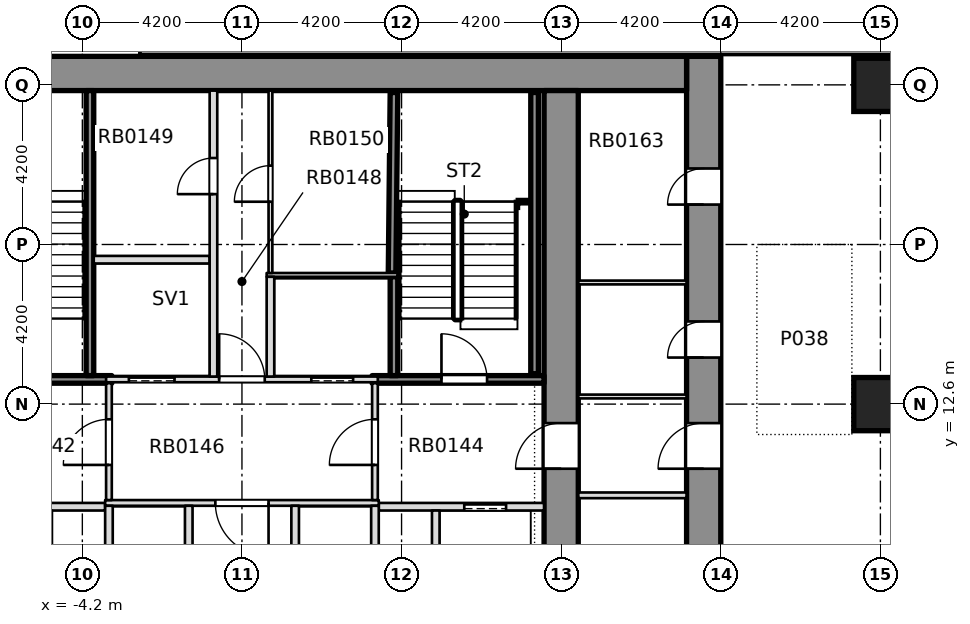
"""IFC4 building model, lengths in metres.
Left out: names, types, materials, properties, quantities, classifications, styles, units other than length and angle.
Written with IfcOpenShell. Run it as: python <this file> out.ifc"""

import sys

from ifc_helpers import new_model, si_unit, direction, frame, frame_2d, origin, origin_2d, place, context, subcontext, project, spatial, rectangle, extrude, element, fill, save


model = new_model("IFC4")
c1 = context("Model", 3, precision=1e-05, world=origin(), true_north=direction((0.0, 1.0)))
c2 = subcontext(c1, "Body", "Model", "MODEL_VIEW")
j1 = project(units=[si_unit("LENGTHUNIT", "METRE"), si_unit("PLANEANGLEUNIT", "RADIAN")], contexts=[c1])
p1 = place(None, origin())
s1 = spatial("IfcSite", under=j1, at=p1, CompositionType="ELEMENT")
p2 = place(p1, origin())
s2 = spatial("IfcBuilding", under=s1, at=p2, CompositionType="ELEMENT")
p3 = place(p2, frame((0.0, 0.0, -4.2)))
s3 = spatial("IfcBuildingStorey", under=s2, at=p3, CompositionType="ELEMENT", Elevation=-4.2)
p4 = place(p3, frame((12.15, -8.4, -0.35), z_axis=(0.0, 0.0, 1.0), x_axis=(0.0, 1.0, 0.0)))
e1 = element("IfcWall", 1, at=p4, inside=s3, PredefinedType="SHEAR", context=c2, shape_type="SweptSolid", body=[
    extrude(rectangle(XDim=30.15, YDim=0.9, at=frame_2d((15.075, 0.0))), origin(), (0.0, 0.0, 1.0), 4.1),
])
p5 = place(p4, frame((3.925, 0.0, 0.35)))
e2 = element("IfcOpeningElement", 2, at=p5, cuts=e1, PredefinedType="OPENING", context=c2, shape_type="SweptSolid", body=[
    extrude(rectangle(XDim=0.95, YDim=2.1, at=frame_2d((0.475, 1.05))), frame((0.0, 0.46, 0.0), z_axis=(0.0, -1.0, 0.0), x_axis=(1.0, 0.0, 0.0)), (0.0, 0.0, 1.0), 0.92),
])
p6 = place(p4, frame((9.175, 0.0, 0.35)))
e3 = element("IfcOpeningElement", 3, at=p6, cuts=e1, PredefinedType="OPENING", context=c2, shape_type="SweptSolid", body=[
    extrude(rectangle(XDim=0.95, YDim=2.1, at=frame_2d((0.475, 1.05))), frame((0.0, 0.46, 0.0), z_axis=(0.0, -1.0, 0.0), x_axis=(1.0, 0.0, 0.0)), (0.0, 0.0, 1.0), 0.92),
])
p7 = place(p4, frame((14.525, 0.0, 0.35)))
e4 = element("IfcOpeningElement", 4, at=p7, cuts=e1, PredefinedType="OPENING", context=c2, shape_type="SweptSolid", body=[
    extrude(rectangle(XDim=0.95, YDim=2.1, at=frame_2d((0.475, 1.05))), frame((0.0, 0.46, 0.0), z_axis=(0.0, -1.0, 0.0), x_axis=(1.0, 0.0, 0.0)), (0.0, 0.0, 1.0), 0.92),
])
p8 = place(p4, frame((22.225, 0.0, 0.35)))
e5 = element("IfcOpeningElement", 5, at=p8, cuts=e1, PredefinedType="OPENING", context=c2, shape_type="SweptSolid", body=[
    extrude(rectangle(XDim=0.95, YDim=2.1, at=frame_2d((0.475, 1.05))), frame((0.0, 0.46, 0.0), z_axis=(0.0, -1.0, 0.0), x_axis=(1.0, 0.0, 0.0)), (0.0, 0.0, 1.0), 0.92),
])
p9 = place(p4, frame((26.25, 0.0, 0.35)))
e6 = element("IfcOpeningElement", 6, at=p9, cuts=e1, PredefinedType="OPENING", context=c2, shape_type="SweptSolid", body=[
    extrude(rectangle(XDim=0.95, YDim=2.1, at=frame_2d((0.475, 1.05))), frame((0.0, 0.46, 0.0), z_axis=(0.0, -1.0, 0.0), x_axis=(1.0, 0.0, 0.0)), (0.0, 0.0, 1.0), 0.92),
])
p10 = place(p4, frame((19.3, 0.0, 0.35)))
e7 = element("IfcOpeningElement", 7, at=p10, cuts=e1, PredefinedType="OPENING", context=c2, shape_type="SweptSolid", body=[
    extrude(rectangle(XDim=1.2, YDim=2.1, at=frame_2d((0.6, 1.05))), frame((0.0, 0.46, 0.0), z_axis=(0.0, -1.0, 0.0), x_axis=(1.0, 0.0, 0.0)), (0.0, 0.0, 1.0), 0.92),
])
p11 = place(p3, frame((-11.7, 21.3, -0.35), z_axis=(0.0, 0.0, 1.0), x_axis=(1.0, 0.0, 0.0)))
e8 = element("IfcWall", 8, at=p11, inside=s3, PredefinedType="SOLIDWALL", context=c2, shape_type="SweptSolid", body=[
    extrude(rectangle(XDim=23.4, YDim=0.9, at=frame_2d((11.7, 0.0))), origin(), (0.0, 0.0, 1.0), 4.1),
])
p12 = place(p3, frame((8.4, -7.5, -0.35), z_axis=(0.0, 0.0, 1.0), x_axis=(0.0, 1.0, 0.0)))
e9 = element("IfcWall", 9, at=p12, inside=s3, PredefinedType="SHEAR", context=c2, shape_type="SweptSolid", body=[
    extrude(rectangle(XDim=28.35, YDim=0.9, at=frame_2d((14.175, 0.0))), origin(), (0.0, 0.0, 1.0), 4.1),
])
p13 = place(p12, frame((18.4, 0.0, 0.35)))
e10 = element("IfcOpeningElement", 10, at=p13, cuts=e9, PredefinedType="OPENING", context=c2, shape_type="SweptSolid", body=[
    extrude(rectangle(XDim=1.2, YDim=2.1, at=frame_2d((0.6, 1.05))), frame((0.0, 0.46, 0.0), z_axis=(0.0, -1.0, 0.0), x_axis=(1.0, 0.0, 0.0)), (0.0, 0.0, 1.0), 0.92),
])
for number, where, z_axis, x_axis in (
    (11, (16.8, 12.6, -0.35), (0.0, 0.0, 1.0), (1.0, 0.0, 0.0)),
    (12, (16.8, 21.0, -0.35), (0.0, 0.0, 1.0), (1.0, 0.0, 0.0)),
):
    element("IfcColumn", number, at=place(p3, frame(where, z_axis=z_axis, x_axis=x_axis)), inside=s3, PredefinedType="COLUMN", context=c2, shape_type="SweptSolid", body=[
        extrude(rectangle(XDim=1.4, YDim=1.4, at=origin_2d()), origin(), (0.0, 0.0, 1.0), 4.1),
    ])
p14 = place(p3, frame((-7.949, 9.9, 0.0), z_axis=(0.0, 0.0, 1.0), x_axis=(1.0, 0.0, 0.0)))
e13 = element("IfcWall", 13, at=p14, inside=s3, PredefinedType="PARTITIONING", context=c2, shape_type="SweptSolid", body=[
    extrude(rectangle(XDim=4.349, YDim=0.2, at=frame_2d((2.174, 0.0))), origin(), (0.0, 0.0, 1.0), 3.75),
])
p15 = place(p14, frame((0.999, 0.0, 0.0)))
e14 = element("IfcOpeningElement", 14, at=p15, cuts=e13, PredefinedType="OPENING", context=c2, shape_type="SweptSolid", body=[
    extrude(rectangle(XDim=1.1, YDim=2.1, at=frame_2d((0.55, 1.05))), frame((0.0, 0.11, 0.0), z_axis=(0.0, -1.0, 0.0), x_axis=(1.0, 0.0, 0.0)), (0.0, 0.0, 1.0), 0.22),
])
p16 = place(p3, frame((3.6, 9.9, 0.0), z_axis=(0.0, 0.0, 1.0), x_axis=(1.0, 0.0, 0.0)))
e15 = element("IfcWall", 15, at=p16, inside=s3, PredefinedType="PARTITIONING", context=c2, shape_type="SweptSolid", body=[
    extrude(rectangle(XDim=4.349, YDim=0.2, at=frame_2d((2.174, 0.0))), origin(), (0.0, 0.0, 1.0), 3.75),
])
p17 = place(p16, frame((2.25, 0.0, 0.0)))
e16 = element("IfcOpeningElement", 16, at=p17, cuts=e15, PredefinedType="OPENING", context=c2, shape_type="SweptSolid", body=[
    extrude(rectangle(XDim=1.1, YDim=2.1, at=frame_2d((0.55, 1.05))), frame((0.0, 0.11, 0.0), z_axis=(0.0, -1.0, 0.0), x_axis=(1.0, 0.0, 0.0)), (0.0, 0.0, 1.0), 0.22),
])
p18 = place(p3, frame((-3.6, 10.0, 0.0), z_axis=(0.0, 0.0, 1.0), x_axis=(1.0, 0.0, 0.0)))
e17 = element("IfcWall", 17, at=p18, inside=s3, PredefinedType="PARTITIONING", context=c2, shape_type="SweptSolid", body=[
    extrude(rectangle(XDim=7.2, YDim=0.15, at=frame_2d((3.6, 0.0))), origin(), (0.0, 0.0, 1.0), 3.75),
])
p19 = place(p18, frame((2.9, 0.0, 0.0)))
e18 = element("IfcOpeningElement", 18, at=p19, cuts=e17, PredefinedType="OPENING", context=c2, shape_type="SweptSolid", body=[
    extrude(rectangle(XDim=1.4, YDim=2.1, at=frame_2d((0.7, 1.05))), frame((0.0, 0.085, 0.0), z_axis=(0.0, -1.0, 0.0), x_axis=(1.0, 0.0, 0.0)), (0.0, 0.0, 1.0), 0.17),
])
p20 = place(p3, frame((-7.949, 13.25, 0.0), z_axis=(0.0, 0.0, 1.0), x_axis=(1.0, 0.0, 0.0)))
e19 = element("IfcWall", 19, at=p20, inside=s3, PredefinedType="SOLIDWALL", context=c2, shape_type="SweptSolid", body=[
    extrude(rectangle(XDim=4.524, YDim=0.2, at=frame_2d((2.262, 0.0))), origin(), (0.0, 0.0, 1.0), 3.75),
])
p21 = place(p20, frame((1.499, 0.0, 0.0)))
e20 = element("IfcOpeningElement", 20, at=p21, cuts=e19, PredefinedType="OPENING", context=c2, shape_type="SweptSolid", body=[
    extrude(rectangle(XDim=1.2, YDim=2.1, at=frame_2d((0.6, 1.05))), frame((0.0, 0.11, 0.0), z_axis=(0.0, -1.0, 0.0), x_axis=(1.0, 0.0, 0.0)), (0.0, 0.0, 1.0), 0.22),
])
p22 = place(p3, frame((-3.575, 13.25, 0.0), z_axis=(0.0, 0.0, 1.0), x_axis=(1.0, 0.0, 0.0)))
e21 = element("IfcWall", 21, at=p22, inside=s3, PredefinedType="PARTITIONING", context=c2, shape_type="SweptSolid", body=[
    extrude(rectangle(XDim=7.15, YDim=0.15, at=frame_2d((3.575, 0.0))), origin(), (0.0, 0.0, 1.0), 3.75),
])
p23 = place(p22, frame((0.6, 0.0, 0.0)))
e22 = element("IfcOpeningElement", 22, at=p23, cuts=e21, PredefinedType="OPENING", context=c2, shape_type="SweptSolid", body=[
    extrude(rectangle(XDim=1.2, YDim=2.1, at=frame_2d((0.6, 1.05))), frame((0.0, 0.085, 0.0), z_axis=(0.0, -1.0, 0.0), x_axis=(1.0, 0.0, 0.0)), (0.0, 0.0, 1.0), 0.17),
])
p24 = place(p22, frame((5.4, 0.0, 0.0)))
e23 = element("IfcOpeningElement", 23, at=p24, cuts=e21, PredefinedType="OPENING", context=c2, shape_type="SweptSolid", body=[
    extrude(rectangle(XDim=1.1, YDim=2.1, at=frame_2d((0.55, 1.05))), frame((0.0, 0.085, 0.0), z_axis=(0.0, -1.0, 0.0), x_axis=(1.0, 0.0, 0.0)), (0.0, 0.0, 1.0), 0.17),
])
p25 = place(p22, frame((2.975, 0.0, 0.0)))
e24 = element("IfcOpeningElement", 24, at=p25, cuts=e21, PredefinedType="OPENING", context=c2, shape_type="SweptSolid", body=[
    extrude(rectangle(XDim=1.2, YDim=2.1, at=frame_2d((0.6, 1.05))), frame((0.0, 0.085, 0.0), z_axis=(0.0, -1.0, 0.0), x_axis=(1.0, 0.0, 0.0)), (0.0, 0.0, 1.0), 0.17),
])
p26 = place(p3, frame((3.425, 13.25, 0.0), z_axis=(0.0, 0.0, 1.0), x_axis=(1.0, 0.0, 0.0)))
e25 = element("IfcWall", 25, at=p26, inside=s3, PredefinedType="SOLIDWALL", context=c2, shape_type="SweptSolid", body=[
    extrude(rectangle(XDim=4.524, YDim=0.2, at=frame_2d((2.262, 0.0))), origin(), (0.0, 0.0, 1.0), 3.75),
])
p27 = place(p26, frame((1.825, 0.0, 0.0)))
e26 = element("IfcOpeningElement", 26, at=p27, cuts=e25, PredefinedType="OPENING", context=c2, shape_type="SweptSolid", body=[
    extrude(rectangle(XDim=1.2, YDim=2.1, at=frame_2d((0.6, 1.05))), frame((0.0, 0.11, 0.0), z_axis=(0.0, -1.0, 0.0), x_axis=(1.0, 0.0, 0.0)), (0.0, 0.0, 1.0), 0.22),
])
p28 = place(p3, frame((0.65, 16.0, 0.0), z_axis=(0.0, 0.0, 1.0), x_axis=(1.0, 0.0, 0.0)))
e27 = element("IfcWall", 27, at=p28, inside=s3, PredefinedType="PARTITIONING", context=c2, shape_type="SweptSolid", body=[
    extrude(rectangle(XDim=3.45, YDim=0.1, at=frame_2d((1.725, 0.0))), origin(), (0.0, 0.0, 1.0), 3.75),
])
p29 = place(p3, frame((-3.9, 16.4, 0.0), z_axis=(0.0, 0.0, 1.0), x_axis=(1.0, 0.0, 0.0)))
e28 = element("IfcWall", 28, at=p29, inside=s3, PredefinedType="PARTITIONING", context=c2, shape_type="SweptSolid", body=[
    extrude(rectangle(XDim=3.05, YDim=0.2, at=frame_2d((1.525, 0.0))), origin(), (0.0, 0.0, 1.0), 3.75),
])
p30 = place(p3, frame((-4.0, 13.35, 0.0), z_axis=(0.0, 0.0, 1.0), x_axis=(0.0, 1.0, 0.0)))
e29 = element("IfcWall", 29, at=p30, inside=s3, PredefinedType="SOLIDWALL", context=c2, shape_type="SweptSolid", body=[
    extrude(rectangle(XDim=7.499, YDim=0.2, at=frame_2d((3.75, 0.0))), origin(), (0.0, 0.0, 1.0), 3.75),
])
p31 = place(p3, frame((-3.5, 7.075, 0.0), z_axis=(0.0, 0.0, 1.0), x_axis=(0.0, 1.0, 0.0)))
e30 = element("IfcWall", 30, at=p31, inside=s3, PredefinedType="PARTITIONING", context=c2, shape_type="SweptSolid", body=[
    extrude(rectangle(XDim=2.85, YDim=0.2, at=frame_2d((1.425, 0.0))), origin(), (0.0, 0.0, 1.0), 3.75),
])
p32 = place(p3, frame((-3.5, 10.075, 0.0), z_axis=(0.0, 0.0, 1.0), x_axis=(0.0, 1.0, 0.0)))
e31 = element("IfcWall", 31, at=p32, inside=s3, PredefinedType="PARTITIONING", context=c2, shape_type="SweptSolid", body=[
    extrude(rectangle(XDim=3.075, YDim=0.15, at=frame_2d((1.538, 0.0))), origin(), (0.0, 0.0, 1.0), 3.75),
])
p33 = place(p32, frame((0.925, 0.0, 0.0)))
e32 = element("IfcOpeningElement", 32, at=p33, cuts=e31, PredefinedType="OPENING", context=c2, shape_type="SweptSolid", body=[
    extrude(rectangle(XDim=1.2, YDim=2.1, at=frame_2d((0.6, 1.05))), frame((0.0, 0.085, 0.0), z_axis=(0.0, -1.0, 0.0), x_axis=(1.0, 0.0, 0.0)), (0.0, 0.0, 1.0), 0.17),
])
p34 = place(p3, frame((-1.4, 7.075, 0.0), z_axis=(0.0, 0.0, 1.0), x_axis=(0.0, 1.0, 0.0)))
e33 = element("IfcWall", 33, at=p34, inside=s3, PredefinedType="PARTITIONING", context=c2, shape_type="SweptSolid", body=[
    extrude(rectangle(XDim=2.85, YDim=0.2, at=frame_2d((1.425, 0.0))), origin(), (0.0, 0.0, 1.0), 3.75),
])
p35 = place(p3, frame((-0.75, 13.325, 0.0), z_axis=(0.0, 0.0, 1.0), x_axis=(0.0, 1.0, 0.0)))
e34 = element("IfcWall", 34, at=p35, inside=s3, PredefinedType="PARTITIONING", context=c2, shape_type="SweptSolid", body=[
    extrude(rectangle(XDim=7.524, YDim=0.2, at=frame_2d((3.762, 0.0))), origin(), (0.0, 0.0, 1.0), 3.75),
])
p36 = place(p35, frame((4.8, 0.0, 0.0)))
e35 = element("IfcOpeningElement", 35, at=p36, cuts=e34, PredefinedType="OPENING", context=c2, shape_type="SweptSolid", body=[
    extrude(rectangle(XDim=0.95, YDim=2.1, at=frame_2d((0.475, 1.05))), frame((0.0, 0.11, 0.0), z_axis=(0.0, -1.0, 0.0), x_axis=(1.0, 0.0, 0.0)), (0.0, 0.0, 1.0), 0.22),
])
p37 = place(p3, frame((0.75, 13.325, 0.0), z_axis=(0.0, 0.0, 1.0), x_axis=(0.0, 1.0, 0.0)))
e36 = element("IfcWall", 36, at=p37, inside=s3, PredefinedType="PARTITIONING", context=c2, shape_type="SweptSolid", body=[
    extrude(rectangle(XDim=2.625, YDim=0.2, at=frame_2d((1.312, 0.0))), origin(), (0.0, 0.0, 1.0), 3.75),
])
p38 = place(p3, frame((0.75, 16.05, 0.0), z_axis=(0.0, 0.0, 1.0), x_axis=(0.0, 1.0, 0.0)))
e37 = element("IfcWall", 37, at=p38, inside=s3, PredefinedType="PARTITIONING", context=c2, shape_type="SweptSolid", body=[
    extrude(rectangle(XDim=4.799, YDim=0.1, at=frame_2d((2.399, 0.0))), origin(), (0.0, 0.0, 1.0), 3.75),
])
p39 = place(p38, frame((1.875, 0.0, 0.0)))
e38 = element("IfcOpeningElement", 38, at=p39, cuts=e37, PredefinedType="OPENING", context=c2, shape_type="SweptSolid", body=[
    extrude(rectangle(XDim=0.95, YDim=2.1, at=frame_2d((0.475, 1.05))), frame((0.0, 0.06, 0.0), z_axis=(0.0, -1.0, 0.0), x_axis=(1.0, 0.0, 0.0)), (0.0, 0.0, 1.0), 0.12),
])
for number, where, z_axis, x_axis in (
    (39, (1.4, 7.075, 0.0), (0.0, 0.0, 1.0), (0.0, 1.0, 0.0)),
    (40, (3.5, 7.075, 0.0), (0.0, 0.0, 1.0), (0.0, 1.0, 0.0)),
):
    element("IfcWall", number, at=place(p3, frame(where, z_axis=z_axis, x_axis=x_axis)), inside=s3, PredefinedType="PARTITIONING", context=c2, shape_type="SweptSolid", body=[
        extrude(rectangle(XDim=2.85, YDim=0.2, at=frame_2d((1.425, 0.0))), origin(), (0.0, 0.0, 1.0), 3.75),
    ])
p40 = place(p3, frame((3.5, 10.075, 0.0), z_axis=(0.0, 0.0, 1.0), x_axis=(0.0, 1.0, 0.0)))
e41 = element("IfcWall", 41, at=p40, inside=s3, PredefinedType="PARTITIONING", context=c2, shape_type="SweptSolid", body=[
    extrude(rectangle(XDim=3.075, YDim=0.15, at=frame_2d((1.538, 0.0))), origin(), (0.0, 0.0, 1.0), 3.75),
])
p41 = place(p40, frame((0.925, 0.0, 0.0)))
e42 = element("IfcOpeningElement", 42, at=p41, cuts=e41, PredefinedType="OPENING", context=c2, shape_type="SweptSolid", body=[
    extrude(rectangle(XDim=1.2, YDim=2.1, at=frame_2d((0.6, 1.05))), frame((0.0, 0.085, 0.0), z_axis=(0.0, -1.0, 0.0), x_axis=(1.0, 0.0, 0.0)), (0.0, 0.0, 1.0), 0.17),
])
p42 = place(p3, frame((4.0, 13.35, 0.0), z_axis=(0.0, 0.0, 1.0), x_axis=(0.0, 1.0, 0.0)))
e43 = element("IfcWall", 43, at=p42, inside=s3, PredefinedType="SOLIDWALL", context=c2, shape_type="SweptSolid", body=[
    extrude(rectangle(XDim=2.6, YDim=0.2, at=frame_2d((1.3, 0.0))), origin(), (0.0, 0.0, 1.0), 3.75),
])
p43 = place(p3, frame((3.95, 16.05, 0.0), z_axis=(0.0, 0.0, 1.0), x_axis=(0.010538176883, 0.999944471872, 0.0)))
e44 = element("IfcWall", 44, at=p43, inside=s3, PredefinedType="SOLIDWALL", context=c2, shape_type="SweptSolid", body=[
    extrude(rectangle(XDim=4.749, YDim=0.2, at=frame_2d((2.375, 0.0))), origin(), (0.0, 0.0, 1.0), 3.75),
])
p44 = place(p3, frame((5.1, 7.075, 0.0), z_axis=(0.0, 0.0, 1.0), x_axis=(0.0, 1.0, 0.0)))
e45 = element("IfcWall", 45, at=p44, inside=s3, PredefinedType="PARTITIONING", context=c2, shape_type="SweptSolid", body=[
    extrude(rectangle(XDim=2.725, YDim=0.2, at=frame_2d((1.363, 0.0))), origin(), (0.0, 0.0, 1.0), 3.75),
])
p45 = place(p3, frame((8.851, 10.2, 0.0), z_axis=(0.0, 0.0, 1.0), x_axis=(1.0, 0.0, 0.0)))
e46 = element("IfcWall", 46, at=p45, inside=s3, PredefinedType="PARTITIONING", context=c2, shape_type="SweptSolid", body=[
    extrude(rectangle(XDim=2.848, YDim=0.15, at=frame_2d((1.424, 0.0))), origin(), (0.0, 0.0, 1.0), 3.75),
])
for number, where, z_axis, x_axis in (
    (47, (8.851, 12.8, 0.0), (0.0, 0.0, 1.0), (1.0, 0.0, 0.0)),
    (48, (8.851, 15.8, 0.0), (0.0, 0.0, 1.0), (1.0, 0.0, 0.0)),
):
    element("IfcWall", number, at=place(p3, frame(where, z_axis=z_axis, x_axis=x_axis)), inside=s3, PredefinedType="PARTITIONING", context=c2, shape_type="SweptSolid", body=[
        extrude(rectangle(XDim=2.848, YDim=0.1, at=frame_2d((1.424, 0.0))), origin(), (0.0, 0.0, 1.0), 3.75),
    ])
p46 = place(p3, frame((7.7, 13.4, 0.0), z_axis=(0.0, 0.0, 1.0), x_axis=(0.0, 1.0, 0.0)))
e49 = element("IfcWall", 49, at=p46, inside=s3, PredefinedType="SOLIDWALL", context=c2, shape_type="SweptSolid", body=[
    extrude(rectangle(XDim=7.4, YDim=0.2, at=frame_2d((3.7, 0.0))), origin(), (0.0, 0.0, 1.0), 3.75),
])
p47 = place(p27, origin())
e50 = element("IfcDoor", 50, at=p47, inside=s3, OperationType="SINGLE_SWING_RIGHT", PredefinedType="DOOR", context=c2, shape_type="SweptSolid", body=[
    extrude(rectangle(XDim=1.2, YDim=2.1, at=frame_2d((0.6, 1.05))), frame((0.0, 0.025, 0.0), z_axis=(0.0, -1.0, 0.0), x_axis=(1.0, 0.0, 0.0)), (0.0, 0.0, 1.0), 0.05),
])
fill(e26, e50)
p48 = place(p17, origin())
e51 = element("IfcDoor", 51, at=p48, inside=s3, OperationType="SLIDING_TO_LEFT", PredefinedType="DOOR", context=c2, shape_type="SweptSolid", body=[
    extrude(rectangle(XDim=1.1, YDim=2.1, at=frame_2d((0.55, 1.05))), frame((0.0, 0.025, 0.0), z_axis=(0.0, -1.0, 0.0), x_axis=(1.0, 0.0, 0.0)), (0.0, 0.0, 1.0), 0.05),
])
fill(e16, e51)
p49 = place(p19, origin())
e52 = element("IfcDoor", 52, at=p49, inside=s3, OperationType="SINGLE_SWING_RIGHT", PredefinedType="DOOR", context=c2, shape_type="SweptSolid", body=[
    extrude(rectangle(XDim=1.4, YDim=2.1, at=frame_2d((0.7, 1.05))), frame((0.0, 0.025, 0.0), z_axis=(0.0, -1.0, 0.0), x_axis=(1.0, 0.0, 0.0)), (0.0, 0.0, 1.0), 0.05),
])
fill(e18, e52)
p50 = place(p23, origin())
e53 = element("IfcDoor", 53, at=p50, inside=s3, OperationType="SLIDING_TO_RIGHT", PredefinedType="DOOR", context=c2, shape_type="SweptSolid", body=[
    extrude(rectangle(XDim=1.2, YDim=2.1, at=frame_2d((0.6, 1.05))), frame((0.0, 0.025, 0.0), z_axis=(0.0, -1.0, 0.0), x_axis=(1.0, 0.0, 0.0)), (0.0, 0.0, 1.0), 0.05),
])
fill(e22, e53)
p51 = place(p24, origin())
e54 = element("IfcDoor", 54, at=p51, inside=s3, OperationType="SLIDING_TO_LEFT", PredefinedType="DOOR", context=c2, shape_type="SweptSolid", body=[
    extrude(rectangle(XDim=1.1, YDim=2.1, at=frame_2d((0.55, 1.05))), frame((0.0, 0.025, 0.0), z_axis=(0.0, -1.0, 0.0), x_axis=(1.0, 0.0, 0.0)), (0.0, 0.0, 1.0), 0.05),
])
fill(e23, e54)
p52 = place(p25, origin())
e55 = element("IfcDoor", 55, at=p52, inside=s3, OperationType="SINGLE_SWING_RIGHT", PredefinedType="DOOR", context=c2, shape_type="SweptSolid", body=[
    extrude(rectangle(XDim=1.2, YDim=2.1, at=frame_2d((0.6, 1.05))), frame((0.0, 0.025, 0.0), z_axis=(0.0, -1.0, 0.0), x_axis=(1.0, 0.0, 0.0)), (0.0, 0.0, 1.0), 0.05),
])
fill(e24, e55)
p53 = place(p36, origin())
e56 = element("IfcDoor", 56, at=p53, inside=s3, OperationType="SINGLE_SWING_RIGHT", PredefinedType="DOOR", context=c2, shape_type="SweptSolid", body=[
    extrude(rectangle(XDim=0.95, YDim=2.1, at=frame_2d((0.475, 1.05))), frame((0.0, 0.025, 0.0), z_axis=(0.0, -1.0, 0.0), x_axis=(1.0, 0.0, 0.0)), (0.0, 0.0, 1.0), 0.05),
])
fill(e35, e56)
p54 = place(p39, origin())
e57 = element("IfcDoor", 57, at=p54, inside=s3, OperationType="SINGLE_SWING_LEFT", PredefinedType="DOOR", context=c2, shape_type="SweptSolid", body=[
    extrude(rectangle(XDim=0.95, YDim=2.1, at=frame_2d((0.475, 1.05))), frame((0.0, 0.025, 0.0), z_axis=(0.0, -1.0, 0.0), x_axis=(1.0, 0.0, 0.0)), (0.0, 0.0, 1.0), 0.05),
])
fill(e38, e57)
p55 = place(p33, origin())
e58 = element("IfcDoor", 58, at=p55, inside=s3, OperationType="SINGLE_SWING_RIGHT", PredefinedType="DOOR", context=c2, shape_type="SweptSolid", body=[
    extrude(rectangle(XDim=1.2, YDim=2.1, at=frame_2d((0.6, 1.05))), frame((0.0, 0.025, 0.0), z_axis=(0.0, -1.0, 0.0), x_axis=(1.0, 0.0, 0.0)), (0.0, 0.0, 1.0), 0.05),
])
fill(e32, e58)
p56 = place(p41, origin())
e59 = element("IfcDoor", 59, at=p56, inside=s3, OperationType="SINGLE_SWING_LEFT", PredefinedType="DOOR", context=c2, shape_type="SweptSolid", body=[
    extrude(rectangle(XDim=1.2, YDim=2.1, at=frame_2d((0.6, 1.05))), frame((0.0, 0.025, 0.0), z_axis=(0.0, -1.0, 0.0), x_axis=(1.0, 0.0, 0.0)), (0.0, 0.0, 1.0), 0.05),
])
fill(e42, e59)
p57 = place(p8, origin())
e60 = element("IfcDoor", 60, at=p57, inside=s3, OperationType="SINGLE_SWING_LEFT", PredefinedType="DOOR", context=c2, shape_type="SweptSolid", body=[
    extrude(rectangle(XDim=0.95, YDim=2.1, at=frame_2d((0.475, 1.05))), frame((0.0, 0.025, 0.0), z_axis=(0.0, -1.0, 0.0), x_axis=(1.0, 0.0, 0.0)), (0.0, 0.0, 1.0), 0.05),
])
fill(e5, e60)
p58 = place(p9, origin())
e61 = element("IfcDoor", 61, at=p58, inside=s3, OperationType="SINGLE_SWING_LEFT", PredefinedType="DOOR", context=c2, shape_type="SweptSolid", body=[
    extrude(rectangle(XDim=0.95, YDim=2.1, at=frame_2d((0.475, 1.05))), frame((0.0, 0.025, 0.0), z_axis=(0.0, -1.0, 0.0), x_axis=(1.0, 0.0, 0.0)), (0.0, 0.0, 1.0), 0.05),
])
fill(e6, e61)
p59 = place(p10, origin())
e62 = element("IfcDoor", 62, at=p59, inside=s3, OperationType="SINGLE_SWING_LEFT", PredefinedType="DOOR", context=c2, shape_type="SweptSolid", body=[
    extrude(rectangle(XDim=1.2, YDim=2.1, at=frame_2d((0.6, 1.05))), frame((0.0, 0.025, 0.0), z_axis=(0.0, -1.0, 0.0), x_axis=(1.0, 0.0, 0.0)), (0.0, 0.0, 1.0), 0.05),
])
fill(e7, e62)
p60 = place(p13, origin())
e63 = element("IfcDoor", 63, at=p60, inside=s3, OperationType="SINGLE_SWING_LEFT", PredefinedType="DOOR", context=c2, shape_type="SweptSolid", body=[
    extrude(rectangle(XDim=1.2, YDim=2.1, at=frame_2d((0.6, 1.05))), frame((0.0, 0.025, 0.0), z_axis=(0.0, -1.0, 0.0), x_axis=(1.0, 0.0, 0.0)), (0.0, 0.0, 1.0), 0.05),
])
fill(e10, e63)
save(model, sys.argv[1])
